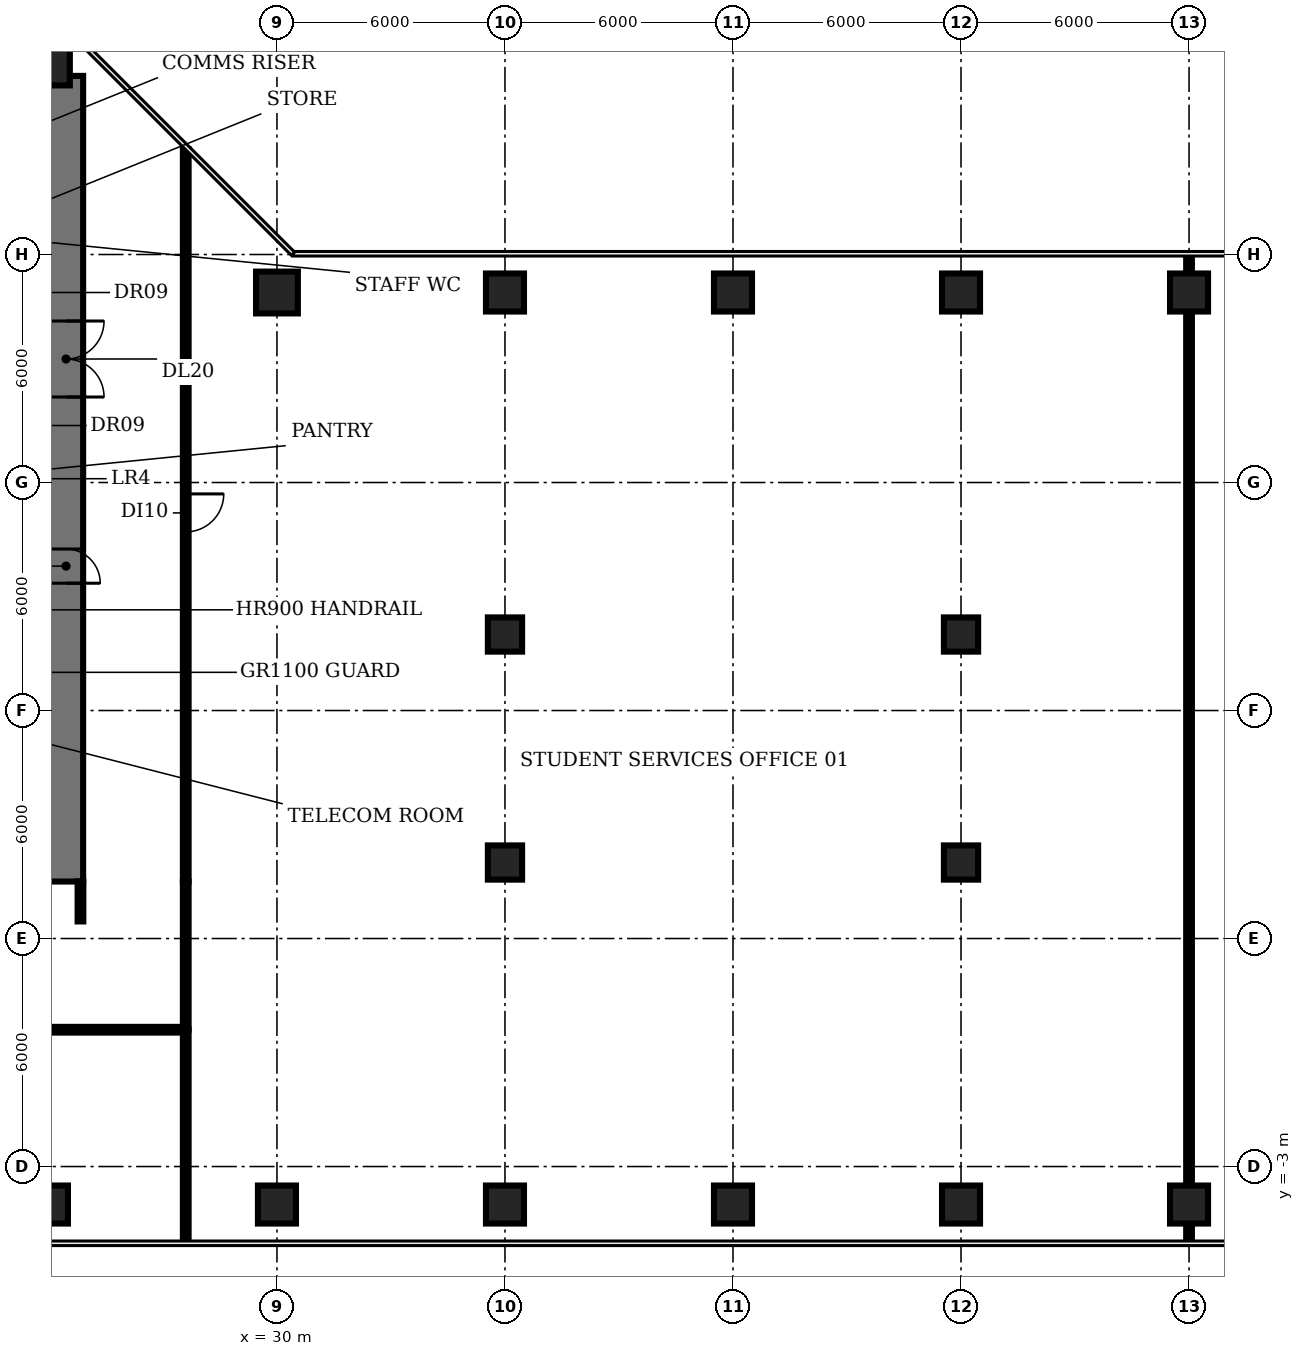
"""IFC4 building model, lengths in metres.
Left out: names, types, materials, properties, quantities, classifications, styles, units other than length and angle.
Written with IfcOpenShell. Run it as: python <this file> out.ifc"""

import sys

from ifc_helpers import new_model, si_unit, direction, frame, frame_2d, origin, origin_2d, place, context, subcontext, project, spatial, rectangle, circle, extrude, element, fill, save


model = new_model("IFC4")
c1 = context("Model", 3, precision=1e-05, world=origin(), true_north=direction((0.0, 1.0)))
c2 = subcontext(c1, "Body", "Model", "MODEL_VIEW")
j1 = project(units=[si_unit("LENGTHUNIT", "METRE"), si_unit("PLANEANGLEUNIT", "RADIAN")], contexts=[c1])
p1 = place(None, origin())
s1 = spatial("IfcSite", under=j1, at=p1, CompositionType="ELEMENT")
p2 = place(p1, origin())
s2 = spatial("IfcBuilding", under=s1, at=p2, CompositionType="ELEMENT")
p3 = place(p2, frame((0.0, 0.0, 20.0)))
s3 = spatial("IfcBuildingStorey", under=s2, at=p3, CompositionType="ELEMENT", Elevation=20.0)
p4 = place(p3, frame((24.0, -4.0, 0.0), z_axis=(0.0, 0.0, 1.0), x_axis=(1.0, 0.0, 0.0)))
e1 = element("IfcColumn", 1, at=p4, inside=s3, PredefinedType="COLUMN", context=c2, shape_type="SweptSolid", body=[
    extrude(rectangle(XDim=1.0, YDim=1.0, at=origin_2d()), origin(), (0.0, 0.0, 1.0), 4.15),
])
p5 = place(p3, frame((24.0, 26.0, 0.0), z_axis=(0.0, 0.0, 1.0), x_axis=(1.0, 0.0, 0.0)))
e2 = element("IfcColumn", 2, at=p5, inside=s3, PredefinedType="COLUMN", context=c2, shape_type="SweptSolid", body=[
    extrude(circle(Radius=0.55, at=origin_2d()), origin(), (0.0, 0.0, 1.0), 4.15),
])
p6 = place(p3, frame((30.0, -4.0, 0.0), z_axis=(0.0, 0.0, 1.0), x_axis=(1.0, 0.0, 0.0)))
e3 = element("IfcColumn", 3, at=p6, inside=s3, PredefinedType="COLUMN", context=c2, shape_type="SweptSolid", body=[
    extrude(rectangle(XDim=1.0, YDim=1.0, at=origin_2d()), origin(), (0.0, 0.0, 1.0), 4.15),
])
p7 = place(p3, frame((30.0, 20.0, 0.0), z_axis=(0.0, 0.0, 1.0), x_axis=(1.0, 0.0, 0.0)))
e4 = element("IfcColumn", 4, at=p7, inside=s3, PredefinedType="COLUMN", context=c2, shape_type="SweptSolid", body=[
    extrude(circle(Radius=0.55, at=origin_2d()), origin(), (0.0, 0.0, 1.0), 4.15),
])
p8 = place(p3, frame((36.0, -4.0, 0.0), z_axis=(0.0, 0.0, 1.0), x_axis=(1.0, 0.0, 0.0)))
e5 = element("IfcColumn", 5, at=p8, inside=s3, PredefinedType="COLUMN", context=c2, shape_type="SweptSolid", body=[
    extrude(rectangle(XDim=1.0, YDim=1.0, at=origin_2d()), origin(), (0.0, 0.0, 1.0), 4.15),
])
for number, where, z_axis, x_axis in (
    (6, (36.0, 5.0, 0.0), (0.0, 0.0, 1.0), (1.0, 0.0, 0.0)),
    (7, (36.0, 11.0, 0.0), (0.0, 0.0, 1.0), (1.0, 0.0, 0.0)),
):
    element("IfcColumn", number, at=place(p3, frame(where, z_axis=z_axis, x_axis=x_axis)), inside=s3, PredefinedType="COLUMN", context=c2, shape_type="SweptSolid", body=[
        extrude(rectangle(XDim=0.9, YDim=0.9, at=origin_2d()), origin(), (0.0, 0.0, 1.0), 4.15),
    ])
for number, where, z_axis, x_axis in (
    (8, (36.0, 20.0, 0.0), (0.0, 0.0, 1.0), (1.0, 0.0, 0.0)),
    (9, (42.0, -4.0, 0.0), (0.0, 0.0, 1.0), (1.0, 0.0, 0.0)),
    (10, (42.0, 20.0, 0.0), (0.0, 0.0, 1.0), (1.0, 0.0, 0.0)),
    (11, (48.0, -4.0, 0.0), (0.0, 0.0, 1.0), (1.0, 0.0, 0.0)),
):
    element("IfcColumn", number, at=place(p3, frame(where, z_axis=z_axis, x_axis=x_axis)), inside=s3, PredefinedType="COLUMN", context=c2, shape_type="SweptSolid", body=[
        extrude(rectangle(XDim=1.0, YDim=1.0, at=origin_2d()), origin(), (0.0, 0.0, 1.0), 4.15),
    ])
for number, where, z_axis, x_axis in (
    (12, (48.0, 5.0, 0.0), (0.0, 0.0, 1.0), (1.0, 0.0, 0.0)),
    (13, (48.0, 11.0, 0.0), (0.0, 0.0, 1.0), (1.0, 0.0, 0.0)),
):
    element("IfcColumn", number, at=place(p3, frame(where, z_axis=z_axis, x_axis=x_axis)), inside=s3, PredefinedType="COLUMN", context=c2, shape_type="SweptSolid", body=[
        extrude(rectangle(XDim=0.9, YDim=0.9, at=origin_2d()), origin(), (0.0, 0.0, 1.0), 4.15),
    ])
for number, where, z_axis, x_axis in (
    (14, (48.0, 20.0, 0.0), (0.0, 0.0, 1.0), (1.0, 0.0, 0.0)),
    (15, (54.0, -4.0, 0.0), (0.0, 0.0, 1.0), (1.0, 0.0, 0.0)),
    (16, (54.0, 20.0, 0.0), (0.0, 0.0, 1.0), (1.0, 0.0, 0.0)),
):
    element("IfcColumn", number, at=place(p3, frame(where, z_axis=z_axis, x_axis=x_axis)), inside=s3, PredefinedType="COLUMN", context=c2, shape_type="SweptSolid", body=[
        extrude(rectangle(XDim=1.0, YDim=1.0, at=origin_2d()), origin(), (0.0, 0.0, 1.0), 4.15),
    ])
p9 = place(p3, frame((24.45, 25.7, 0.0), z_axis=(0.0, 0.0, 1.0), x_axis=(0.0, -1.0, 0.0)))
e17 = element("IfcWall", 17, at=p9, inside=s3, PredefinedType="SHEAR", context=c2, shape_type="SweptSolid", body=[
    extrude(rectangle(XDim=21.2, YDim=0.9, at=frame_2d((10.6, 0.0))), origin(), (0.0, 0.0, 1.0), 4.15),
])
p10 = place(p9, frame((12.45, 0.0, 0.0)))
e18 = element("IfcOpeningElement", 18, at=p10, cuts=e17, PredefinedType="OPENING", context=c2, shape_type="SweptSolid", body=[
    extrude(rectangle(XDim=0.9, YDim=2.1, at=frame_2d((0.45, 1.05))), frame((0.0, 0.46, 0.0), z_axis=(0.0, -1.0, 0.0), x_axis=(1.0, 0.0, 0.0)), (0.0, 0.0, 1.0), 0.92),
])
p11 = place(p9, frame((6.45, 0.0, 0.0)))
e19 = element("IfcOpeningElement", 19, at=p11, cuts=e17, PredefinedType="OPENING", context=c2, shape_type="SweptSolid", body=[
    extrude(rectangle(XDim=2.0, YDim=2.1, at=frame_2d((1.0, 1.05))), frame((0.0, 0.46, 0.0), z_axis=(0.0, -1.0, 0.0), x_axis=(1.0, 0.0, 0.0)), (0.0, 0.0, 1.0), 0.92),
])
p12 = place(p3, frame((24.83, 3.45, 0.0), z_axis=(0.0, 0.0, 1.0), x_axis=(0.0, 1.0, 0.0)))
e20 = element("IfcWall", 20, at=p12, inside=s3, PredefinedType="PARTITIONING", context=c2, shape_type="SweptSolid", body=[
    extrude(rectangle(XDim=1.05, YDim=0.15, at=frame_2d((0.525, 0.0))), origin(), (0.0, 0.0, 1.0), 3.08),
])
p13 = place(p3, frame((27.6, -4.97, 0.0), z_axis=(0.0, 0.0, 1.0), x_axis=(0.0, 1.0, 0.0)))
e21 = element("IfcWall", 21, at=p13, inside=s3, PredefinedType="PARTITIONING", context=c2, shape_type="SweptSolid", body=[
    extrude(rectangle(XDim=5.57, YDim=0.15, at=frame_2d((2.785, 0.0))), origin(), (0.0, 0.0, 1.0), 3.08),
])
p14 = place(p3, frame((27.6, 0.6, 0.0), z_axis=(0.0, 0.0, 1.0), x_axis=(-1.0, 0.0, 0.0)))
e22 = element("IfcWall", 22, at=p14, inside=s3, PredefinedType="PARTITIONING", context=c2, shape_type="SweptSolid", body=[
    extrude(rectangle(XDim=25.2, YDim=0.15, at=frame_2d((12.6, 0.0))), origin(), (0.0, 0.0, 1.0), 3.08),
])
p15 = place(p14, frame((12.1, 0.0, 0.0)))
e23 = element("IfcOpeningElement", 23, at=p15, cuts=e22, PredefinedType="OPENING", context=c2, shape_type="SweptSolid", body=[
    extrude(rectangle(XDim=1.2, YDim=2.1, at=frame_2d((0.6, 1.05))), frame((0.0, 0.085, 0.0), z_axis=(0.0, -1.0, 0.0), x_axis=(1.0, 0.0, 0.0)), (0.0, 0.0, 1.0), 0.17),
])
p16 = place(p3, frame((27.6, 0.6, 0.0), z_axis=(0.0, 0.0, 1.0), x_axis=(0.0, 1.0, 0.0)))
e24 = element("IfcWall", 24, at=p16, inside=s3, PredefinedType="PARTITIONING", context=c2, shape_type="SweptSolid", body=[
    extrude(rectangle(XDim=3.9, YDim=0.15, at=frame_2d((1.95, 0.0))), origin(), (0.0, 0.0, 1.0), 3.08),
])
p17 = place(p3, frame((27.6, 23.77, 0.0), z_axis=(0.0, 0.0, 1.0), x_axis=(0.0, -1.0, 0.0)))
e25 = element("IfcWall", 25, at=p17, inside=s3, PredefinedType="PARTITIONING", context=c2, shape_type="SweptSolid", body=[
    extrude(rectangle(XDim=19.27, YDim=0.15, at=frame_2d((9.635, 0.0))), origin(), (0.0, 0.0, 1.0), 3.08),
])
p18 = place(p17, frame((9.07, 0.0, 0.0)))
e26 = element("IfcOpeningElement", 26, at=p18, cuts=e25, PredefinedType="OPENING", context=c2, shape_type="SweptSolid", body=[
    extrude(rectangle(XDim=1.0, YDim=2.1, at=frame_2d((0.5, 1.05))), frame((0.0, 0.085, 0.0), z_axis=(0.0, -1.0, 0.0), x_axis=(1.0, 0.0, 0.0)), (0.0, 0.0, 1.0), 0.17),
])
p19 = place(p3, frame((54.0, -4.97, 0.0), z_axis=(0.0, 0.0, 1.0), x_axis=(0.0, 1.0, 0.0)))
e27 = element("IfcWall", 27, at=p19, inside=s3, PredefinedType="PARTITIONING", context=c2, shape_type="SweptSolid", body=[
    extrude(rectangle(XDim=25.94, YDim=0.15, at=frame_2d((12.97, 0.0))), origin(), (0.0, 0.0, 1.0), 3.08),
])
p20 = place(p11, origin())
e28 = element("IfcDoor", 28, at=p20, inside=s3, OperationType="DOUBLE_DOOR_SINGLE_SWING", PredefinedType="DOOR", context=c2, shape_type="SweptSolid", body=[
    extrude(rectangle(XDim=2.0, YDim=2.1, at=frame_2d((1.0, 1.05))), frame((0.0, 0.025, 0.0), z_axis=(0.0, -1.0, 0.0), x_axis=(1.0, 0.0, 0.0)), (0.0, 0.0, 1.0), 0.05),
])
fill(e19, e28)
p21 = place(p18, origin())
e29 = element("IfcDoor", 29, at=p21, inside=s3, OperationType="SINGLE_SWING_LEFT", PredefinedType="DOOR", context=c2, shape_type="SweptSolid", body=[
    extrude(rectangle(XDim=1.0, YDim=2.1, at=frame_2d((0.5, 1.05))), frame((0.0, 0.025, 0.0), z_axis=(0.0, -1.0, 0.0), x_axis=(1.0, 0.0, 0.0)), (0.0, 0.0, 1.0), 0.05),
])
fill(e26, e29)
save(model, sys.argv[1])
